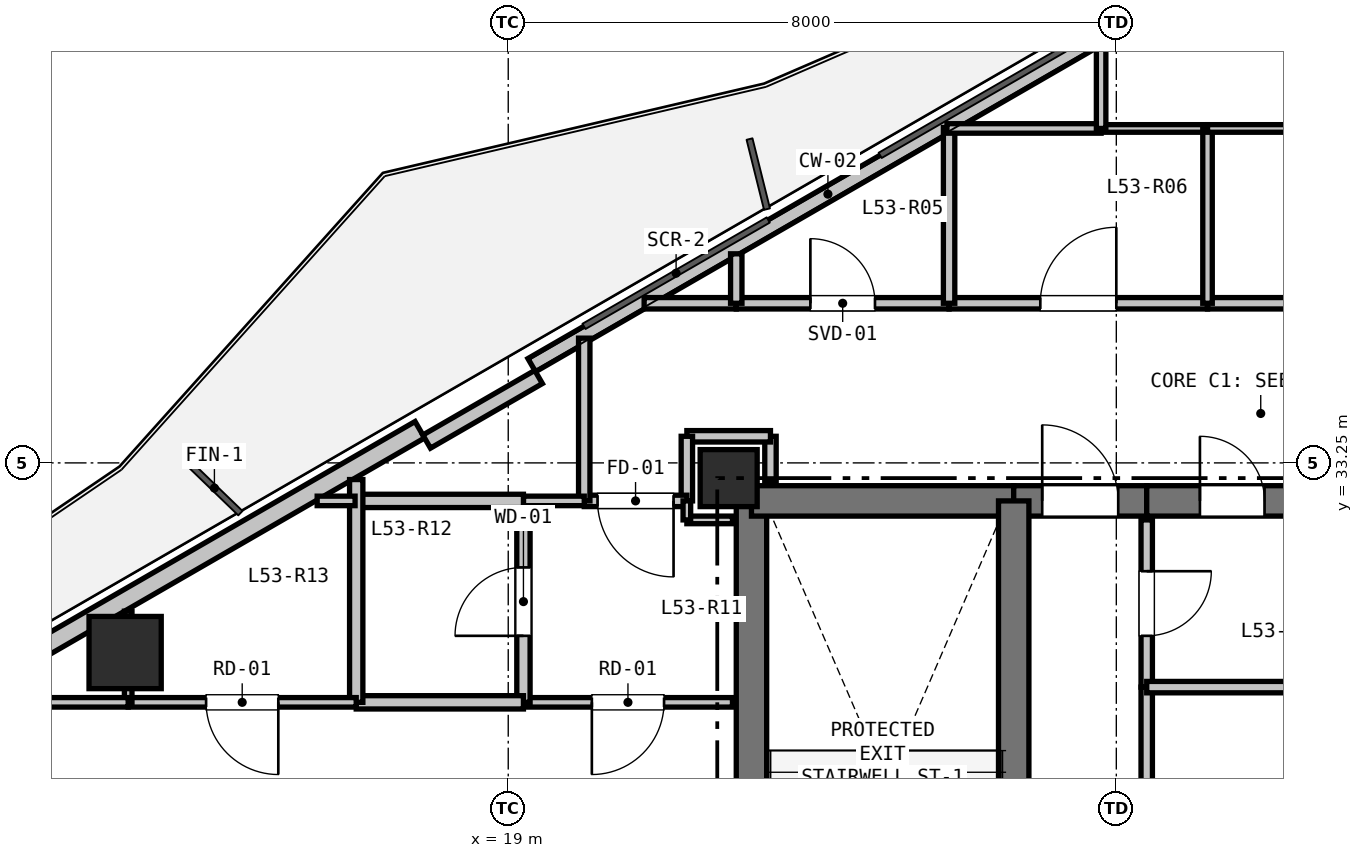
"""IFC4 building model, lengths in metres.
Left out: names, types, materials, properties, quantities, classifications, styles, units other than length and angle.
Written with IfcOpenShell. Run it as: python <this file> out.ifc"""

import sys

from ifc_helpers import new_model, si_unit, direction, frame, frame_2d, origin, origin_2d, place, context, subcontext, project, spatial, rectangle, hollow_rectangle, extrude, element, fill, save


model = new_model("IFC4")
c1 = context("Model", 3, precision=1e-05, world=origin(), true_north=direction((0.0, 1.0)))
c2 = subcontext(c1, "Body", "Model", "MODEL_VIEW")
j1 = project(units=[si_unit("LENGTHUNIT", "METRE"), si_unit("PLANEANGLEUNIT", "RADIAN")], contexts=[c1])
p1 = place(None, origin())
s1 = spatial("IfcSite", under=j1, at=p1, CompositionType="ELEMENT")
p2 = place(p1, origin())
s2 = spatial("IfcBuilding", under=s1, at=p2, CompositionType="ELEMENT")
p3 = place(p2, frame((0.0, 0.0, 192.0)))
s3 = spatial("IfcBuildingStorey", under=s2, at=p3, CompositionType="ELEMENT", Elevation=192.0)
p4 = place(p3, frame((21.9, 33.05, 0.0), z_axis=(0.0, 0.0, 1.0), x_axis=(1.0, 0.0, 0.0)))
e1 = element("IfcColumn", 1, at=p4, inside=s3, PredefinedType="COLUMN", context=c2, shape_type="SweptSolid", body=[
    extrude(rectangle(XDim=0.75, YDim=0.75, at=origin_2d()), origin(), (0.0, 0.0, 1.0), 3.3),
])
p5 = place(p3, frame((13.96, 30.755, 0.0), z_axis=(0.0, 0.0, 1.0), x_axis=(1.0, 0.0, 0.0)))
e2 = element("IfcColumn", 2, at=p5, inside=s3, PredefinedType="COLUMN", context=c2, shape_type="SweptSolid", body=[
    extrude(hollow_rectangle(XDim=0.95, YDim=0.95, WallThickness=0.028, at=origin_2d()), origin(), (0.0, 0.0, 1.0), 3.3),
])
p6 = place(p3, frame((9.438, 28.837, 0.0), z_axis=(0.0, 0.0, 1.0), x_axis=(0.866027133173, 0.499997004599, 0.0)))
e3 = element("IfcWall", 3, at=p6, inside=s3, PredefinedType="SOLIDWALL", context=c2, shape_type="SweptSolid", body=[
    extrude(rectangle(XDim=9.699, YDim=0.25, at=frame_2d((4.849, 0.0))), origin(), (0.0, 0.0, 1.0), 2.69),
])
p7 = place(p3, frame((19.309, 34.536, 0.0), z_axis=(0.0, 0.0, 1.0), x_axis=(0.866020680503, 0.500008180874, 0.0)))
e4 = element("IfcWall", 4, at=p7, inside=s3, PredefinedType="PARAPET", context=c2, shape_type="SweptSolid", body=[
    extrude(rectangle(XDim=8.999, YDim=0.2, at=frame_2d((4.5, 0.0))), origin(), (0.0, 0.0, 1.0), 0.2),
])
p8 = place(p3, frame((17.927, 33.53, 0.0), z_axis=(0.0, 0.0, 1.0), x_axis=(0.86605165483, 0.499954529098, 0.0)))
e5 = element("IfcWall", 5, at=p8, inside=s3, PredefinedType="PARAPET", context=c2, shape_type="SweptSolid", body=[
    extrude(rectangle(XDim=1.7, YDim=0.2, at=frame_2d((0.85, 0.0))), origin(), (0.0, 0.0, 1.0), 2.69),
])
p9 = place(p3, frame((22.2, 25.4, 0.0), z_axis=(0.0, 0.0, 1.0), x_axis=(0.0, 1.0, 0.0)))
e6 = element("IfcWall", 6, at=p9, inside=s3, PredefinedType="SHEAR", context=c2, shape_type="SweptSolid", body=[
    extrude(rectangle(XDim=7.35, YDim=0.4, at=frame_2d((3.675, 0.0))), origin(), (0.0, 0.0, 1.0), 3.07),
])
p10 = place(p3, frame((22.2, 32.75, 0.0), z_axis=(0.0, 0.0, 1.0), x_axis=(1.0, 0.0, 0.0)))
e7 = element("IfcWall", 7, at=p10, inside=s3, PredefinedType="SHEAR", context=c2, shape_type="SweptSolid", body=[
    extrude(rectangle(XDim=3.45, YDim=0.4, at=frame_2d((1.725, 0.0))), origin(), (0.0, 0.0, 1.0), 3.07),
])
p11 = place(p3, frame((25.65, 32.75, 0.0), z_axis=(0.0, 0.0, 1.0), x_axis=(1.0, 0.0, 0.0)))
e8 = element("IfcWall", 8, at=p11, inside=s3, PredefinedType="SHEAR", context=c2, shape_type="SweptSolid", body=[
    extrude(rectangle(XDim=1.75, YDim=0.4, at=frame_2d((0.875, 0.0))), origin(), (0.0, 0.0, 1.0), 3.07),
])
p12 = place(p11, frame((0.375, 0.0, 0.0)))
e9 = element("IfcOpeningElement", 9, at=p12, cuts=e8, PredefinedType="OPENING", context=c2, shape_type="SweptSolid", body=[
    extrude(rectangle(XDim=1.0, YDim=2.15, at=frame_2d((0.5, 1.075))), frame((0.0, 0.21, 0.0), z_axis=(0.0, -1.0, 0.0), x_axis=(1.0, 0.0, 0.0)), (0.0, 0.0, 1.0), 0.42),
])
p13 = place(p3, frame((27.4, 32.75, 0.0), z_axis=(0.0, 0.0, 1.0), x_axis=(1.0, 0.0, 0.0)))
e10 = element("IfcWall", 10, at=p13, inside=s3, PredefinedType="SHEAR", context=c2, shape_type="SweptSolid", body=[
    extrude(rectangle(XDim=2.25, YDim=0.4, at=frame_2d((1.125, 0.0))), origin(), (0.0, 0.0, 1.0), 3.07),
])
p14 = place(p13, frame((0.7, 0.0, 0.0)))
e11 = element("IfcOpeningElement", 11, at=p14, cuts=e10, PredefinedType="OPENING", context=c2, shape_type="SweptSolid", body=[
    extrude(rectangle(XDim=0.85, YDim=2.1, at=frame_2d((0.425, 1.05))), frame((0.0, 0.21, 0.0), z_axis=(0.0, -1.0, 0.0), x_axis=(1.0, 0.0, 0.0)), (0.0, 0.0, 1.0), 0.42),
])
p15 = place(p3, frame((25.65, 27.95, 0.0), z_axis=(0.0, 0.0, 1.0), x_axis=(0.0, 1.0, 0.0)))
e12 = element("IfcWall", 12, at=p15, inside=s3, PredefinedType="SHEAR", context=c2, shape_type="SweptSolid", body=[
    extrude(rectangle(XDim=4.8, YDim=0.4, at=frame_2d((2.4, 0.0))), origin(), (0.0, 0.0, 1.0), 3.07),
])
p16 = place(p3, frame((27.4, 32.5, 0.0), z_axis=(0.0, 0.0, 1.0), x_axis=(0.0, -1.0, 0.0)))
e13 = element("IfcWall", 13, at=p16, inside=s3, PredefinedType="PARTITIONING", context=c2, shape_type="SweptSolid", body=[
    extrude(rectangle(XDim=2.2, YDim=0.15, at=frame_2d((1.1, 0.0))), origin(), (0.0, 0.0, 1.0), 3.07),
])
p17 = place(p16, frame((0.675, 0.0, 0.0)))
e14 = element("IfcOpeningElement", 14, at=p17, cuts=e13, PredefinedType="OPENING", context=c2, shape_type="SweptSolid", body=[
    extrude(rectangle(XDim=0.85, YDim=2.1, at=frame_2d((0.425, 1.05))), frame((0.0, 0.085, 0.0), z_axis=(0.0, -1.0, 0.0), x_axis=(1.0, 0.0, 0.0)), (0.0, 0.0, 1.0), 0.17),
])
p18 = place(p3, frame((27.4, 30.3, 0.0), z_axis=(0.0, 0.0, 1.0), x_axis=(0.0, -1.0, 0.0)))
e15 = element("IfcWall", 15, at=p18, inside=s3, PredefinedType="PARTITIONING", context=c2, shape_type="SweptSolid", body=[
    extrude(rectangle(XDim=2.35, YDim=0.15, at=frame_2d((1.175, 0.0))), origin(), (0.0, 0.0, 1.0), 3.07),
])
p19 = place(p3, frame((22.45, 33.0, 0.0), z_axis=(0.0, 0.0, 1.0), x_axis=(0.0, 1.0, 0.0)))
e16 = element("IfcWall", 16, at=p19, inside=s3, PredefinedType="PARTITIONING", context=c2, shape_type="SweptSolid", body=[
    extrude(rectangle(XDim=0.6, YDim=0.15, at=frame_2d((0.3, 0.0))), origin(), (0.0, 0.0, 1.0), 2.595),
])
p20 = place(p3, frame((22.45, 33.6, 0.0), z_axis=(0.0, 0.0, 1.0), x_axis=(-1.0, 0.0, 0.0)))
e17 = element("IfcWall", 17, at=p20, inside=s3, PredefinedType="PARTITIONING", context=c2, shape_type="SweptSolid", body=[
    extrude(rectangle(XDim=1.1, YDim=0.15, at=frame_2d((0.55, 0.0))), origin(), (0.0, 0.0, 1.0), 3.07),
])
p21 = place(p3, frame((21.35, 33.6, 0.0), z_axis=(0.0, 0.0, 1.0), x_axis=(0.0, -1.0, 0.0)))
e18 = element("IfcWall", 18, at=p21, inside=s3, PredefinedType="PARTITIONING", context=c2, shape_type="SweptSolid", body=[
    extrude(rectangle(XDim=0.85, YDim=0.15, at=frame_2d((0.425, 0.0))), origin(), (0.0, 0.0, 1.0), 2.518),
])
p22 = place(p3, frame((21.35, 32.75, 0.0), z_axis=(0.0, 0.0, 1.0), x_axis=(-1.0, 0.0, 0.0)))
e19 = element("IfcWall", 19, at=p22, inside=s3, PredefinedType="PARTITIONING", context=c2, shape_type="SweptSolid", body=[
    extrude(rectangle(XDim=1.35, YDim=0.15, at=frame_2d((0.675, 0.0))), origin(), (0.0, 0.0, 1.0), 2.518),
])
p23 = place(p22, frame((0.175, 0.0, 0.0)))
e20 = element("IfcOpeningElement", 20, at=p23, cuts=e19, PredefinedType="OPENING", context=c2, shape_type="SweptSolid", body=[
    extrude(rectangle(XDim=1.0, YDim=2.15, at=frame_2d((0.5, 1.075))), frame((0.0, 0.085, 0.0), z_axis=(0.0, -1.0, 0.0), x_axis=(1.0, 0.0, 0.0)), (0.0, 0.0, 1.0), 0.17),
])
p24 = place(p3, frame((20.0, 32.75, 0.0), z_axis=(0.0, 0.0, 1.0), x_axis=(0.0, 1.0, 0.0)))
e21 = element("IfcWall", 21, at=p24, inside=s3, PredefinedType="PARTITIONING", context=c2, shape_type="SweptSolid", body=[
    extrude(rectangle(XDim=2.141, YDim=0.15, at=frame_2d((1.071, 0.0))), origin(), (0.0, 0.0, 1.0), 2.365),
])
p25 = place(p3, frame((20.788, 35.35, 0.0), z_axis=(0.0, 0.0, 1.0), x_axis=(1.0, 0.0, 0.0)))
e22 = element("IfcWall", 22, at=p25, inside=s3, PredefinedType="PARTITIONING", context=c2, shape_type="SweptSolid", body=[
    extrude(rectangle(XDim=1.212, YDim=0.15, at=frame_2d((0.606, 0.0))), origin(), (0.0, 0.0, 1.0), 2.365),
])
p26 = place(p3, frame((22.0, 35.35, 0.0), z_axis=(0.0, 0.0, 1.0), x_axis=(1.0, 0.0, 0.0)))
e23 = element("IfcWall", 23, at=p26, inside=s3, PredefinedType="PARTITIONING", context=c2, shape_type="SweptSolid", body=[
    extrude(rectangle(XDim=2.8, YDim=0.15, at=frame_2d((1.4, 0.0))), origin(), (0.0, 0.0, 1.0), 2.365),
])
p27 = place(p26, frame((0.975, 0.0, 0.0)))
e24 = element("IfcOpeningElement", 24, at=p27, cuts=e23, PredefinedType="OPENING", context=c2, shape_type="SweptSolid", body=[
    extrude(rectangle(XDim=0.85, YDim=2.1, at=frame_2d((0.425, 1.05))), frame((0.0, 0.085, 0.0), z_axis=(0.0, -1.0, 0.0), x_axis=(1.0, 0.0, 0.0)), (0.0, 0.0, 1.0), 0.17),
])
p28 = place(p3, frame((24.8, 35.35, 0.0), z_axis=(0.0, 0.0, 1.0), x_axis=(1.0, 0.0, 0.0)))
e25 = element("IfcWall", 25, at=p28, inside=s3, PredefinedType="PARTITIONING", context=c2, shape_type="SweptSolid", body=[
    extrude(rectangle(XDim=3.4, YDim=0.15, at=frame_2d((1.7, 0.0))), origin(), (0.0, 0.0, 1.0), 3.07),
])
p29 = place(p28, frame((1.2, 0.0, 0.0)))
e26 = element("IfcOpeningElement", 26, at=p29, cuts=e25, PredefinedType="OPENING", context=c2, shape_type="SweptSolid", body=[
    extrude(rectangle(XDim=1.0, YDim=2.15, at=frame_2d((0.5, 1.075))), frame((0.0, 0.085, 0.0), z_axis=(0.0, -1.0, 0.0), x_axis=(1.0, 0.0, 0.0)), (0.0, 0.0, 1.0), 0.17),
])
p30 = place(p3, frame((28.2, 35.35, 0.0), z_axis=(0.0, 0.0, 1.0), x_axis=(1.0, 0.0, 0.0)))
e27 = element("IfcWall", 27, at=p30, inside=s3, PredefinedType="PARTITIONING", context=c2, shape_type="SweptSolid", body=[
    extrude(rectangle(XDim=5.8, YDim=0.15, at=frame_2d((2.9, 0.0))), origin(), (0.0, 0.0, 1.0), 3.07),
])
p31 = place(p3, frame((21.35, 32.5, 0.0), z_axis=(0.0, 0.0, 1.0), x_axis=(1.0, 0.0, 0.0)))
e28 = element("IfcWall", 28, at=p31, inside=s3, PredefinedType="PARTITIONING", context=c2, shape_type="SweptSolid", body=[
    extrude(rectangle(XDim=0.6, YDim=0.1, at=frame_2d((0.3, 0.0))), origin(), (0.0, 0.0, 1.0), 2.595),
])
p32 = place(p3, frame((21.95, 30.1, 0.0), z_axis=(0.0, 0.0, 1.0), x_axis=(-1.0, 0.0, 0.0)))
e29 = element("IfcWall", 29, at=p32, inside=s3, PredefinedType="PARTITIONING", context=c2, shape_type="SweptSolid", body=[
    extrude(rectangle(XDim=2.75, YDim=0.125, at=frame_2d((1.375, 0.0))), origin(), (0.0, 0.0, 1.0), 2.595),
])
p33 = place(p32, frame((0.9, 0.0, 0.0)))
e30 = element("IfcOpeningElement", 30, at=p33, cuts=e29, PredefinedType="OPENING", context=c2, shape_type="SweptSolid", body=[
    extrude(rectangle(XDim=0.95, YDim=2.1, at=frame_2d((0.475, 1.05))), frame((0.0, 0.073, 0.0), z_axis=(0.0, -1.0, 0.0), x_axis=(1.0, 0.0, 0.0)), (0.0, 0.0, 1.0), 0.145),
])
p34 = place(p3, frame((19.2, 30.1, 0.0), z_axis=(0.0, 0.0, 1.0), x_axis=(0.0, 1.0, 0.0)))
e31 = element("IfcWall", 31, at=p34, inside=s3, PredefinedType="PLUMBINGWALL", context=c2, shape_type="SweptSolid", body=[
    extrude(rectangle(XDim=2.65, YDim=0.175, at=frame_2d((1.325, 0.0))), origin(), (0.0, 0.0, 1.0), 2.518),
])
p35 = place(p34, frame((0.875, 0.0, 0.0)))
e32 = element("IfcOpeningElement", 32, at=p35, cuts=e31, PredefinedType="OPENING", context=c2, shape_type="SweptSolid", body=[
    extrude(rectangle(XDim=0.9, YDim=2.1, at=frame_2d((0.45, 1.05))), frame((0.0, 0.097, 0.0), z_axis=(0.0, -1.0, 0.0), x_axis=(1.0, 0.0, 0.0)), (0.0, 0.0, 1.0), 0.195),
])
p36 = place(p3, frame((19.2, 32.75, 0.0), z_axis=(0.0, 0.0, 1.0), x_axis=(1.0, 0.0, 0.0)))
e33 = element("IfcWall", 33, at=p36, inside=s3, PredefinedType="PARTITIONING", context=c2, shape_type="SweptSolid", body=[
    extrude(rectangle(XDim=0.8, YDim=0.125, at=frame_2d((0.4, 0.0))), origin(), (0.0, 0.0, 1.0), 3.07),
])
p37 = place(p3, frame((21.35, 32.75, 0.0), z_axis=(0.0, 0.0, 1.0), x_axis=(0.0, -1.0, 0.0)))
e34 = element("IfcWall", 34, at=p37, inside=s3, PredefinedType="PARTITIONING", context=c2, shape_type="SweptSolid", body=[
    extrude(rectangle(XDim=0.25, YDim=0.1, at=frame_2d((0.125, 0.0))), origin(), (0.0, 0.0, 1.0), 3.07),
])
p38 = place(p3, frame((17.0, 32.75, 0.0), z_axis=(0.0, 0.0, 1.0), x_axis=(1.0, 0.0, 0.0)))
e35 = element("IfcWall", 35, at=p38, inside=s3, PredefinedType="PLUMBINGWALL", context=c2, shape_type="SweptSolid", body=[
    extrude(rectangle(XDim=2.2, YDim=0.175, at=frame_2d((1.1, 0.0))), origin(), (0.0, 0.0, 1.0), 2.365),
])
p39 = place(p3, frame((19.2, 30.1, 0.0), z_axis=(0.0, 0.0, 1.0), x_axis=(-1.0, 0.0, 0.0)))
e36 = element("IfcWall", 36, at=p39, inside=s3, PredefinedType="PLUMBINGWALL", context=c2, shape_type="SweptSolid", body=[
    extrude(rectangle(XDim=2.2, YDim=0.175, at=frame_2d((1.1, 0.0))), origin(), (0.0, 0.0, 1.0), 3.07),
])
p40 = place(p3, frame((17.0, 30.1, 0.0), z_axis=(0.0, 0.0, 1.0), x_axis=(0.0, 1.0, 0.0)))
e37 = element("IfcWall", 37, at=p40, inside=s3, PredefinedType="PLUMBINGWALL", context=c2, shape_type="SweptSolid", body=[
    extrude(rectangle(XDim=2.931, YDim=0.175, at=frame_2d((1.465, 0.0))), origin(), (0.0, 0.0, 1.0), 2.365),
])
p41 = place(p3, frame((17.0, 30.1, 0.0), z_axis=(0.0, 0.0, 1.0), x_axis=(-1.0, 0.0, 0.0)))
e38 = element("IfcWall", 38, at=p41, inside=s3, PredefinedType="PARTITIONING", context=c2, shape_type="SweptSolid", body=[
    extrude(rectangle(XDim=3.0, YDim=0.125, at=frame_2d((1.5, 0.0))), origin(), (0.0, 0.0, 1.0), 3.07),
])
p42 = place(p41, frame((1.025, 0.0, 0.0)))
e39 = element("IfcOpeningElement", 39, at=p42, cuts=e38, PredefinedType="OPENING", context=c2, shape_type="SweptSolid", body=[
    extrude(rectangle(XDim=0.95, YDim=2.1, at=frame_2d((0.475, 1.05))), frame((0.0, 0.073, 0.0), z_axis=(0.0, -1.0, 0.0), x_axis=(1.0, 0.0, 0.0)), (0.0, 0.0, 1.0), 0.145),
])
p43 = place(p3, frame((14.0, 30.1, 0.0), z_axis=(0.0, 0.0, 1.0), x_axis=(0.0, 1.0, 0.0)))
e40 = element("IfcWall", 40, at=p43, inside=s3, PredefinedType="PARTITIONING", context=c2, shape_type="SweptSolid", body=[
    extrude(rectangle(XDim=1.199, YDim=0.1, at=frame_2d((0.599, 0.0))), origin(), (0.0, 0.0, 1.0), 3.07),
])
p44 = place(p3, frame((16.486, 32.75, 0.0), z_axis=(0.0, 0.0, 1.0), x_axis=(1.0, 0.0, 0.0)))
e41 = element("IfcWall", 41, at=p44, inside=s3, PredefinedType="PARTITIONING", context=c2, shape_type="SweptSolid", body=[
    extrude(rectangle(XDim=0.499, YDim=0.125, at=frame_2d((0.25, 0.0))), origin(), (0.0, 0.0, 1.0), 3.07),
])
p45 = place(p3, frame((27.4, 30.3, 0.0), z_axis=(0.0, 0.0, 1.0), x_axis=(1.0, 0.0, 0.0)))
e42 = element("IfcWall", 42, at=p45, inside=s3, PredefinedType="PARTITIONING", context=c2, shape_type="SweptSolid", body=[
    extrude(rectangle(XDim=2.25, YDim=0.15, at=frame_2d((1.125, 0.0))), origin(), (0.0, 0.0, 1.0), 3.07),
])
p46 = place(p3, frame((24.8, 37.662, 0.0), z_axis=(0.0, 0.0, 1.0), x_axis=(0.0, -1.0, 0.0)))
e43 = element("IfcWall", 43, at=p46, inside=s3, PredefinedType="PARTITIONING", context=c2, shape_type="SweptSolid", body=[
    extrude(rectangle(XDim=2.312, YDim=0.15, at=frame_2d((1.156, 0.0))), origin(), (0.0, 0.0, 1.0), 2.365),
])
p47 = place(p3, frame((22.0, 35.35, 0.0), z_axis=(0.0, 0.0, 1.0), x_axis=(0.0, 1.0, 0.0)))
e44 = element("IfcWall", 44, at=p47, inside=s3, PredefinedType="PARTITIONING", context=c2, shape_type="SweptSolid", body=[
    extrude(rectangle(XDim=0.651, YDim=0.15, at=frame_2d((0.325, 0.0))), origin(), (0.0, 0.0, 1.0), 2.365),
])
p48 = place(p3, frame((24.771, 37.65, 0.0), z_axis=(0.0, 0.0, 1.0), x_axis=(1.0, 0.0, 0.0)))
e45 = element("IfcWall", 45, at=p48, inside=s3, PredefinedType="PARTITIONING", context=c2, shape_type="SweptSolid", body=[
    extrude(rectangle(XDim=2.029, YDim=0.125, at=frame_2d((1.014, 0.0))), origin(), (0.0, 0.0, 1.0), 2.365),
])
p49 = place(p3, frame((26.8, 37.65, 0.0), z_axis=(0.0, 0.0, 1.0), x_axis=(1.0, 0.0, 0.0)))
e46 = element("IfcWall", 46, at=p49, inside=s3, PredefinedType="PARTITIONING", context=c2, shape_type="SweptSolid", body=[
    extrude(rectangle(XDim=1.4, YDim=0.1, at=frame_2d((0.7, 0.0))), origin(), (0.0, 0.0, 1.0), 3.07),
])
p50 = place(p3, frame((28.2, 37.65, 0.0), z_axis=(0.0, 0.0, 1.0), x_axis=(0.0, -1.0, 0.0)))
e47 = element("IfcWall", 47, at=p50, inside=s3, PredefinedType="PARTITIONING", context=c2, shape_type="SweptSolid", body=[
    extrude(rectangle(XDim=2.3, YDim=0.125, at=frame_2d((1.15, 0.0))), origin(), (0.0, 0.0, 1.0), 3.07),
])
p51 = place(p3, frame((34.0, 37.65, 0.0), z_axis=(0.0, 0.0, 1.0), x_axis=(-1.0, 0.0, 0.0)))
e48 = element("IfcWall", 48, at=p51, inside=s3, PredefinedType="PARTITIONING", context=c2, shape_type="SweptSolid", body=[
    extrude(rectangle(XDim=5.8, YDim=0.1, at=frame_2d((2.9, 0.0))), origin(), (0.0, 0.0, 1.0), 3.07),
])
p52 = place(p3, frame((26.8, 37.65, 0.0), z_axis=(0.0, 0.0, 1.0), x_axis=(0.0, 1.0, 0.0)))
e49 = element("IfcWall", 49, at=p52, inside=s3, PredefinedType="PARTITIONING", context=c2, shape_type="SweptSolid", body=[
    extrude(rectangle(XDim=1.167, YDim=0.125, at=frame_2d((0.583, 0.0))), origin(), (0.0, 0.0, 1.0), 2.365),
])
p53 = place(p3, frame((11.896, 30.1, 0.0), z_axis=(0.0, 0.0, 1.0), x_axis=(1.0, 0.0, 0.0)))
e50 = element("IfcWall", 50, at=p53, inside=s3, PredefinedType="PARTITIONING", context=c2, shape_type="SweptSolid", body=[
    extrude(rectangle(XDim=2.104, YDim=0.125, at=frame_2d((1.052, 0.0))), origin(), (0.0, 0.0, 1.0), 2.795),
])
p54 = place(p12, origin())
e51 = element("IfcDoor", 51, at=p54, inside=s3, OperationType="SINGLE_SWING_LEFT", PredefinedType="DOOR", context=c2, shape_type="SweptSolid", body=[
    extrude(rectangle(XDim=1.0, YDim=2.15, at=frame_2d((0.5, 1.075))), frame((0.0, 0.025, 0.0), z_axis=(0.0, -1.0, 0.0), x_axis=(1.0, 0.0, 0.0)), (0.0, 0.0, 1.0), 0.05),
])
fill(e9, e51)
p55 = place(p17, origin())
e52 = element("IfcDoor", 52, at=p55, inside=s3, OperationType="SINGLE_SWING_LEFT", PredefinedType="DOOR", context=c2, shape_type="SweptSolid", body=[
    extrude(rectangle(XDim=0.85, YDim=2.1, at=frame_2d((0.425, 1.05))), frame((0.0, 0.025, 0.0), z_axis=(0.0, -1.0, 0.0), x_axis=(1.0, 0.0, 0.0)), (0.0, 0.0, 1.0), 0.05),
])
fill(e14, e52)
p56 = place(p23, origin())
e53 = element("IfcDoor", 53, at=p56, inside=s3, OperationType="SINGLE_SWING_LEFT", PredefinedType="DOOR", context=c2, shape_type="SweptSolid", body=[
    extrude(rectangle(XDim=1.0, YDim=2.15, at=frame_2d((0.5, 1.075))), frame((0.0, 0.025, 0.0), z_axis=(0.0, -1.0, 0.0), x_axis=(1.0, 0.0, 0.0)), (0.0, 0.0, 1.0), 0.05),
])
fill(e20, e53)
p57 = place(p14, origin())
e54 = element("IfcDoor", 54, at=p57, inside=s3, OperationType="SINGLE_SWING_LEFT", PredefinedType="DOOR", context=c2, shape_type="SweptSolid", body=[
    extrude(rectangle(XDim=0.85, YDim=2.1, at=frame_2d((0.425, 1.05))), frame((0.0, 0.025, 0.0), z_axis=(0.0, -1.0, 0.0), x_axis=(1.0, 0.0, 0.0)), (0.0, 0.0, 1.0), 0.05),
])
fill(e11, e54)
p58 = place(p27, origin())
e55 = element("IfcDoor", 55, at=p58, inside=s3, OperationType="SINGLE_SWING_LEFT", PredefinedType="DOOR", context=c2, shape_type="SweptSolid", body=[
    extrude(rectangle(XDim=0.85, YDim=2.1, at=frame_2d((0.425, 1.05))), frame((0.0, 0.025, 0.0), z_axis=(0.0, -1.0, 0.0), x_axis=(1.0, 0.0, 0.0)), (0.0, 0.0, 1.0), 0.05),
])
fill(e24, e55)
p59 = place(p29, origin())
e56 = element("IfcDoor", 56, at=p59, inside=s3, OperationType="SINGLE_SWING_RIGHT", PredefinedType="DOOR", context=c2, shape_type="SweptSolid", body=[
    extrude(rectangle(XDim=1.0, YDim=2.15, at=frame_2d((0.5, 1.075))), frame((0.0, 0.025, 0.0), z_axis=(0.0, -1.0, 0.0), x_axis=(1.0, 0.0, 0.0)), (0.0, 0.0, 1.0), 0.05),
])
fill(e26, e56)
p60 = place(p35, origin())
e57 = element("IfcDoor", 57, at=p60, inside=s3, OperationType="SINGLE_SWING_LEFT", PredefinedType="DOOR", context=c2, shape_type="SweptSolid", body=[
    extrude(rectangle(XDim=0.9, YDim=2.1, at=frame_2d((0.45, 1.05))), frame((0.0, 0.025, 0.0), z_axis=(0.0, -1.0, 0.0), x_axis=(1.0, 0.0, 0.0)), (0.0, 0.0, 1.0), 0.05),
])
fill(e32, e57)
p61 = place(p33, origin())
e58 = element("IfcDoor", 58, at=p61, inside=s3, OperationType="SINGLE_SWING_RIGHT", PredefinedType="DOOR", context=c2, shape_type="SweptSolid", body=[
    extrude(rectangle(XDim=0.95, YDim=2.1, at=frame_2d((0.475, 1.05))), frame((0.0, 0.025, 0.0), z_axis=(0.0, -1.0, 0.0), x_axis=(1.0, 0.0, 0.0)), (0.0, 0.0, 1.0), 0.05),
])
fill(e30, e58)
p62 = place(p42, origin())
e59 = element("IfcDoor", 59, at=p62, inside=s3, OperationType="SINGLE_SWING_LEFT", PredefinedType="DOOR", context=c2, shape_type="SweptSolid", body=[
    extrude(rectangle(XDim=0.95, YDim=2.1, at=frame_2d((0.475, 1.05))), frame((0.0, 0.025, 0.0), z_axis=(0.0, -1.0, 0.0), x_axis=(1.0, 0.0, 0.0)), (0.0, 0.0, 1.0), 0.05),
])
fill(e39, e59)
save(model, sys.argv[1])
